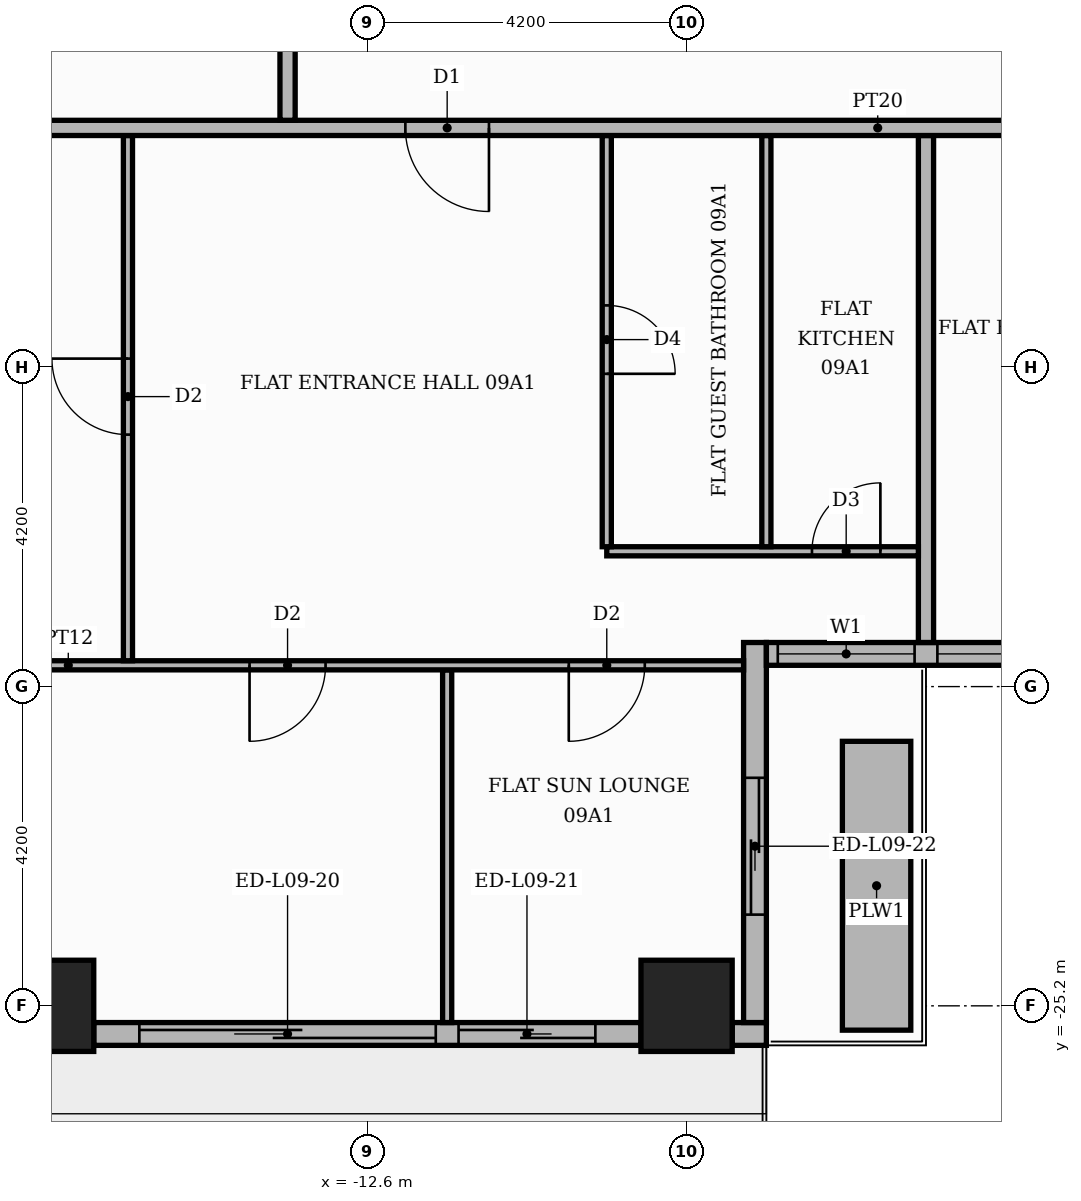
"""IFC4 building model, lengths in metres.
Left out: names, types, materials, properties, quantities, classifications, styles, units other than length and angle.
Written with IfcOpenShell. Run it as: python <this file> out.ifc"""

import sys

from ifc_helpers import new_model, si_unit, direction, frame, frame_2d, origin, origin_2d, place, context, subcontext, project, spatial, rectangle, extrude, element, fill, save


model = new_model("IFC4")
c1 = context("Model", 3, precision=1e-05, world=origin(), true_north=direction((0.0, 1.0)))
c2 = subcontext(c1, "Body", "Model", "MODEL_VIEW")
j1 = project(units=[si_unit("LENGTHUNIT", "METRE"), si_unit("PLANEANGLEUNIT", "RADIAN")], contexts=[c1])
p1 = place(None, origin())
s1 = spatial("IfcSite", under=j1, at=p1, CompositionType="ELEMENT")
p2 = place(p1, origin())
s2 = spatial("IfcBuilding", under=s1, at=p2, CompositionType="ELEMENT")
p3 = place(p2, frame((0.0, 0.0, 42.6)))
s3 = spatial("IfcBuildingStorey", under=s2, at=p3, CompositionType="ELEMENT", Elevation=42.6)
for number, where, z_axis, x_axis in (
    (1, (-8.4, -25.2, 0.0), (0.0, 0.0, 1.0), (1.0, 0.0, 0.0)),
    (2, (-16.8, -25.2, 0.0), (0.0, 0.0, 1.0), (1.0, 0.0, 0.0)),
):
    element("IfcColumn", number, at=place(p3, frame(where, z_axis=z_axis, x_axis=x_axis)), inside=s3, PredefinedType="COLUMN", context=c2, shape_type="SweptSolid", body=[
        extrude(rectangle(XDim=1.2, YDim=1.2, at=origin_2d()), origin(), (0.0, 0.0, 1.0), 3.9),
    ])
p4 = place(p3, frame((-16.2, -25.57, 0.0), z_axis=(0.0, 0.0, 1.0), x_axis=(1.0, 0.0, 0.0)))
e3 = element("IfcWall", 3, at=p4, inside=s3, PredefinedType="STANDARD", context=c2, shape_type="SweptSolid", body=[
    extrude(rectangle(XDim=7.2, YDim=0.3, at=frame_2d((3.6, 0.0))), origin(), (0.0, 0.0, 1.0), 3.48),
])
p5 = place(p4, frame((0.6, 0.0, 0.0)))
e4 = element("IfcOpeningElement", 4, at=p5, cuts=e3, PredefinedType="OPENING", context=c2, shape_type="SweptSolid", body=[
    extrude(rectangle(XDim=3.9, YDim=2.4, at=frame_2d((1.95, 1.2))), frame((0.0, 0.16, 0.0), z_axis=(0.0, -1.0, 0.0), x_axis=(1.0, 0.0, 0.0)), (0.0, 0.0, 1.0), 0.32),
])
p6 = place(p4, frame((4.8, 0.0, 0.0)))
e5 = element("IfcOpeningElement", 5, at=p6, cuts=e3, PredefinedType="OPENING", context=c2, shape_type="SweptSolid", body=[
    extrude(rectangle(XDim=1.8, YDim=2.4, at=frame_2d((0.9, 1.2))), frame((0.0, 0.16, 0.0), z_axis=(0.0, -1.0, 0.0), x_axis=(1.0, 0.0, 0.0)), (0.0, 0.0, 1.0), 0.32),
])
p7 = place(p3, frame((-7.8, -25.57, 0.0), z_axis=(0.0, 0.0, 1.0), x_axis=(1.0, 0.0, 0.0)))
e6 = element("IfcWall", 6, at=p7, inside=s3, PredefinedType="STANDARD", context=c2, shape_type="SweptSolid", body=[
    extrude(rectangle(XDim=0.45, YDim=0.3, at=frame_2d((0.225, 0.0))), origin(), (0.0, 0.0, 1.0), 3.48),
])
p8 = place(p3, frame((-7.5, -25.42, 0.0), z_axis=(0.0, 0.0, 1.0), x_axis=(0.0, 1.0, 0.0)))
e7 = element("IfcWall", 7, at=p8, inside=s3, PredefinedType="STANDARD", context=c2, shape_type="SweptSolid", body=[
    extrude(rectangle(XDim=5.0, YDim=0.3, at=frame_2d((2.5, 0.0))), origin(), (0.0, 0.0, 1.0), 3.48),
])
p9 = place(p8, frame((1.42, 0.0, 0.0)))
e8 = element("IfcOpeningElement", 8, at=p9, cuts=e7, PredefinedType="OPENING", context=c2, shape_type="SweptSolid", body=[
    extrude(rectangle(XDim=1.8, YDim=2.4, at=frame_2d((0.9, 1.2))), frame((0.0, 0.16, 0.0), z_axis=(0.0, -1.0, 0.0), x_axis=(1.0, 0.0, 0.0)), (0.0, 0.0, 1.0), 0.32),
])
p10 = place(p3, frame((-7.35, -20.57, 0.0), z_axis=(0.0, 0.0, 1.0), x_axis=(1.0, 0.0, 0.0)))
e9 = element("IfcWall", 9, at=p10, inside=s3, PredefinedType="STANDARD", context=c2, shape_type="SweptSolid", body=[
    extrude(rectangle(XDim=15.0, YDim=0.3, at=frame_2d((7.5, 0.0))), origin(), (0.0, 0.0, 1.0), 3.48),
])
p11 = place(p10, frame((0.15, 0.0, 0.9)))
e10 = element("IfcOpeningElement", 10, at=p11, cuts=e9, PredefinedType="OPENING", context=c2, shape_type="SweptSolid", body=[
    extrude(rectangle(XDim=1.8, YDim=2.1, at=frame_2d((0.9, 1.05))), frame((0.0, 0.16, 0.0), z_axis=(0.0, -1.0, 0.0), x_axis=(1.0, 0.0, 0.0)), (0.0, 0.0, 1.0), 0.32),
])
p12 = place(p10, frame((2.25, 0.0, 0.9)))
e11 = element("IfcOpeningElement", 11, at=p12, cuts=e9, PredefinedType="OPENING", context=c2, shape_type="SweptSolid", body=[
    extrude(rectangle(XDim=6.0, YDim=2.1, at=frame_2d((3.0, 1.05))), frame((0.0, 0.16, 0.0), z_axis=(0.0, -1.0, 0.0), x_axis=(1.0, 0.0, 0.0)), (0.0, 0.0, 1.0), 0.32),
])
p13 = place(p10, frame((8.55, 0.0, 0.9)))
e12 = element("IfcOpeningElement", 12, at=p13, cuts=e9, PredefinedType="OPENING", context=c2, shape_type="SweptSolid", body=[
    extrude(rectangle(XDim=6.0, YDim=2.1, at=frame_2d((3.0, 1.05))), frame((0.0, 0.16, 0.0), z_axis=(0.0, -1.0, 0.0), x_axis=(1.0, 0.0, 0.0)), (0.0, 0.0, 1.0), 0.32),
])
p14 = place(p3, frame((-5.9, -25.52, 0.0), z_axis=(0.0, 0.0, 1.0), x_axis=(0.0, 1.0, 0.0)))
e13 = element("IfcWall", 13, at=p14, inside=s3, PredefinedType="MOVABLE", context=c2, shape_type="SweptSolid", body=[
    extrude(rectangle(XDim=3.8, YDim=0.9, at=frame_2d((1.9, 0.0))), origin(), (0.0, 0.0, 1.0), 0.6),
])
p15 = place(p3, frame((-11.55, -25.42, 0.0), z_axis=(0.0, 0.0, 1.0), x_axis=(0.0, 1.0, 0.0)))
e14 = element("IfcWall", 14, at=p15, inside=s3, PredefinedType="PARTITIONING", context=c2, shape_type="SweptSolid", body=[
    extrude(rectangle(XDim=4.64, YDim=0.12, at=frame_2d((2.32, 0.0))), origin(), (0.0, 0.0, 1.0), 3.48),
])
p16 = place(p3, frame((-25.42, -20.72, 0.0), z_axis=(0.0, 0.0, 1.0), x_axis=(1.0, 0.0, 0.0)))
e15 = element("IfcWall", 15, at=p16, inside=s3, PredefinedType="PARTITIONING", context=c2, shape_type="SweptSolid", body=[
    extrude(rectangle(XDim=17.77, YDim=0.12, at=frame_2d((8.885, 0.0))), origin(), (0.0, 0.0, 1.0), 3.48),
])
p17 = place(p16, frame((11.27, 0.0, 0.0)))
e16 = element("IfcOpeningElement", 16, at=p17, cuts=e15, PredefinedType="OPENING", context=c2, shape_type="SweptSolid", body=[
    extrude(rectangle(XDim=1.0, YDim=2.1, at=frame_2d((0.5, 1.05))), frame((0.0, 0.07, 0.0), z_axis=(0.0, -1.0, 0.0), x_axis=(1.0, 0.0, 0.0)), (0.0, 0.0, 1.0), 0.14),
])
p18 = place(p16, frame((15.47, 0.0, 0.0)))
e17 = element("IfcOpeningElement", 17, at=p18, cuts=e15, PredefinedType="OPENING", context=c2, shape_type="SweptSolid", body=[
    extrude(rectangle(XDim=1.0, YDim=2.1, at=frame_2d((0.5, 1.05))), frame((0.0, 0.07, 0.0), z_axis=(0.0, -1.0, 0.0), x_axis=(1.0, 0.0, 0.0)), (0.0, 0.0, 1.0), 0.14),
])
p19 = place(p3, frame((-5.25, -20.42, 0.0), z_axis=(0.0, 0.0, 1.0), x_axis=(0.0, 1.0, 0.0)))
e18 = element("IfcWall", 18, at=p19, inside=s3, PredefinedType="PARTITIONING", context=c2, shape_type="SweptSolid", body=[
    extrude(rectangle(XDim=6.67, YDim=0.2, at=frame_2d((3.335, 0.0))), origin(), (0.0, 0.0, 1.0), 3.48),
])
p20 = place(p3, frame((-15.75, -20.66, 0.0), z_axis=(0.0, 0.0, 1.0), x_axis=(0.0, 1.0, 0.0)))
e19 = element("IfcWall", 19, at=p20, inside=s3, PredefinedType="PARTITIONING", context=c2, shape_type="SweptSolid", body=[
    extrude(rectangle(XDim=6.91, YDim=0.12, at=frame_2d((3.455, 0.0))), origin(), (0.0, 0.0, 1.0), 3.48),
])
p21 = place(p20, frame((2.975, 0.0, 0.0)))
e20 = element("IfcOpeningElement", 20, at=p21, cuts=e19, PredefinedType="OPENING", context=c2, shape_type="SweptSolid", body=[
    extrude(rectangle(XDim=1.0, YDim=2.1, at=frame_2d((0.5, 1.05))), frame((0.0, 0.07, 0.0), z_axis=(0.0, -1.0, 0.0), x_axis=(1.0, 0.0, 0.0)), (0.0, 0.0, 1.0), 0.14),
])
p22 = place(p3, frame((-9.45, -19.22, 0.0), z_axis=(0.0, 0.0, 1.0), x_axis=(1.0, 0.0, 0.0)))
e21 = element("IfcWall", 21, at=p22, inside=s3, PredefinedType="PARTITIONING", context=c2, shape_type="SweptSolid", body=[
    extrude(rectangle(XDim=4.1, YDim=0.12, at=frame_2d((2.05, 0.0))), origin(), (0.0, 0.0, 1.0), 3.48),
])
p23 = place(p22, frame((2.7, 0.0, 0.0)))
e22 = element("IfcOpeningElement", 22, at=p23, cuts=e21, PredefinedType="OPENING", context=c2, shape_type="SweptSolid", body=[
    extrude(rectangle(XDim=0.9, YDim=2.1, at=frame_2d((0.45, 1.05))), frame((0.0, 0.07, 0.0), z_axis=(0.0, -1.0, 0.0), x_axis=(1.0, 0.0, 0.0)), (0.0, 0.0, 1.0), 0.14),
])
p24 = place(p3, frame((-9.45, -19.16, 0.0), z_axis=(0.0, 0.0, 1.0), x_axis=(0.0, 1.0, 0.0)))
e23 = element("IfcWall", 23, at=p24, inside=s3, PredefinedType="PARTITIONING", context=c2, shape_type="SweptSolid", body=[
    extrude(rectangle(XDim=5.41, YDim=0.12, at=frame_2d((2.705, 0.0))), origin(), (0.0, 0.0, 1.0), 3.48),
])
p25 = place(p24, frame((2.275, 0.0, 0.0)))
e24 = element("IfcOpeningElement", 24, at=p25, cuts=e23, PredefinedType="OPENING", context=c2, shape_type="SweptSolid", body=[
    extrude(rectangle(XDim=0.9, YDim=2.1, at=frame_2d((0.45, 1.05))), frame((0.0, 0.07, 0.0), z_axis=(0.0, -1.0, 0.0), x_axis=(1.0, 0.0, 0.0)), (0.0, 0.0, 1.0), 0.14),
])
p26 = place(p3, frame((-7.35, -19.16, 0.0), z_axis=(0.0, 0.0, 1.0), x_axis=(0.0, 1.0, 0.0)))
e25 = element("IfcWall", 25, at=p26, inside=s3, PredefinedType="PARTITIONING", context=c2, shape_type="SweptSolid", body=[
    extrude(rectangle(XDim=5.41, YDim=0.12, at=frame_2d((2.705, 0.0))), origin(), (0.0, 0.0, 1.0), 3.48),
])
p27 = place(p3, frame((-25.42, -13.65, 0.0), z_axis=(0.0, 0.0, 1.0), x_axis=(1.0, 0.0, 0.0)))
e26 = element("IfcWall", 26, at=p27, inside=s3, PredefinedType="PARTITIONING", context=c2, shape_type="SweptSolid", body=[
    extrude(rectangle(XDim=39.07, YDim=0.2, at=frame_2d((19.535, 0.0))), origin(), (0.0, 0.0, 1.0), 3.48),
])
p28 = place(p27, frame((13.32, 0.0, 0.0)))
e27 = element("IfcOpeningElement", 27, at=p28, cuts=e26, PredefinedType="OPENING", context=c2, shape_type="SweptSolid", body=[
    extrude(rectangle(XDim=1.1, YDim=2.4, at=frame_2d((0.55, 1.2))), frame((0.0, 0.11, 0.0), z_axis=(0.0, -1.0, 0.0), x_axis=(1.0, 0.0, 0.0)), (0.0, 0.0, 1.0), 0.22),
])
p29 = place(p27, frame((21.72, 0.0, 0.0)))
e28 = element("IfcOpeningElement", 28, at=p29, cuts=e26, PredefinedType="OPENING", context=c2, shape_type="SweptSolid", body=[
    extrude(rectangle(XDim=1.1, YDim=2.4, at=frame_2d((0.55, 1.2))), frame((0.0, 0.11, 0.0), z_axis=(0.0, -1.0, 0.0), x_axis=(1.0, 0.0, 0.0)), (0.0, 0.0, 1.0), 0.22),
])
p30 = place(p3, frame((-13.65, -13.55, 0.0), z_axis=(0.0, 0.0, 1.0), x_axis=(0.0, 1.0, 0.0)))
e29 = element("IfcWall", 29, at=p30, inside=s3, PredefinedType="PARTITIONING", context=c2, shape_type="SweptSolid", body=[
    extrude(rectangle(XDim=27.1, YDim=0.2, at=frame_2d((13.55, 0.0))), origin(), (0.0, 0.0, 1.0), 3.48),
])
p31 = place(p30, frame((24.55, 0.0, 0.0)))
e30 = element("IfcOpeningElement", 30, at=p31, cuts=e29, PredefinedType="OPENING", context=c2, shape_type="SweptSolid", body=[
    extrude(rectangle(XDim=1.1, YDim=2.4, at=frame_2d((0.55, 1.2))), frame((0.0, 0.11, 0.0), z_axis=(0.0, -1.0, 0.0), x_axis=(1.0, 0.0, 0.0)), (0.0, 0.0, 1.0), 0.22),
])
p32 = place(p5, origin())
e31 = element("IfcDoor", 31, at=p32, inside=s3, OperationType="SLIDING_TO_LEFT", PredefinedType="DOOR", context=c2, shape_type="SweptSolid", body=[
    extrude(rectangle(XDim=3.9, YDim=2.4, at=frame_2d((1.95, 1.2))), frame((0.0, 0.025, 0.0), z_axis=(0.0, -1.0, 0.0), x_axis=(1.0, 0.0, 0.0)), (0.0, 0.0, 1.0), 0.05),
])
fill(e4, e31)
p33 = place(p6, origin())
e32 = element("IfcDoor", 32, at=p33, inside=s3, OperationType="SLIDING_TO_RIGHT", PredefinedType="DOOR", context=c2, shape_type="SweptSolid", body=[
    extrude(rectangle(XDim=1.8, YDim=2.4, at=frame_2d((0.9, 1.2))), frame((0.0, 0.025, 0.0), z_axis=(0.0, -1.0, 0.0), x_axis=(1.0, 0.0, 0.0)), (0.0, 0.0, 1.0), 0.05),
])
fill(e5, e32)
p34 = place(p9, origin())
e33 = element("IfcDoor", 33, at=p34, inside=s3, OperationType="SLIDING_TO_LEFT", PredefinedType="DOOR", context=c2, shape_type="SweptSolid", body=[
    extrude(rectangle(XDim=1.8, YDim=2.4, at=frame_2d((0.9, 1.2))), frame((0.0, 0.025, 0.0), z_axis=(0.0, -1.0, 0.0), x_axis=(1.0, 0.0, 0.0)), (0.0, 0.0, 1.0), 0.05),
])
fill(e8, e33)
p35 = place(p11, origin())
e34 = element("IfcWindow", 34, at=p35, inside=s3, PartitioningType="SINGLE_PANEL", PredefinedType="WINDOW", context=c2, shape_type="SweptSolid", body=[
    extrude(rectangle(XDim=1.8, YDim=2.1, at=frame_2d((0.9, 1.05))), frame((0.0, 0.03, 0.0), z_axis=(0.0, -1.0, 0.0), x_axis=(1.0, 0.0, 0.0)), (0.0, 0.0, 1.0), 0.06),
])
fill(e10, e34)
p36 = place(p12, origin())
e35 = element("IfcWindow", 35, at=p36, inside=s3, PartitioningType="SINGLE_PANEL", PredefinedType="WINDOW", context=c2, shape_type="SweptSolid", body=[
    extrude(rectangle(XDim=6.0, YDim=2.1, at=frame_2d((3.0, 1.05))), frame((0.0, 0.03, 0.0), z_axis=(0.0, -1.0, 0.0), x_axis=(1.0, 0.0, 0.0)), (0.0, 0.0, 1.0), 0.06),
])
fill(e11, e35)
p37 = place(p28, frame((1.1, 0.0, 0.0), z_axis=(0.0, 0.0, 1.0), x_axis=(-1.0, 0.0, 0.0)))
e36 = element("IfcDoor", 36, at=p37, inside=s3, OperationType="SINGLE_SWING_RIGHT", PredefinedType="DOOR", context=c2, shape_type="SweptSolid", body=[
    extrude(rectangle(XDim=1.1, YDim=2.4, at=frame_2d((0.55, 1.2))), frame((0.0, 0.025, 0.0), z_axis=(0.0, -1.0, 0.0), x_axis=(1.0, 0.0, 0.0)), (0.0, 0.0, 1.0), 0.05),
])
fill(e27, e36)
p38 = place(p21, origin())
e37 = element("IfcDoor", 37, at=p38, inside=s3, OperationType="SINGLE_SWING_RIGHT", PredefinedType="DOOR", context=c2, shape_type="SweptSolid", body=[
    extrude(rectangle(XDim=1.0, YDim=2.1, at=frame_2d((0.5, 1.05))), frame((0.0, 0.025, 0.0), z_axis=(0.0, -1.0, 0.0), x_axis=(1.0, 0.0, 0.0)), (0.0, 0.0, 1.0), 0.05),
])
fill(e20, e37)
p39 = place(p25, frame((0.9, 0.0, 0.0), z_axis=(0.0, 0.0, 1.0), x_axis=(-1.0, 0.0, 0.0)))
e38 = element("IfcDoor", 38, at=p39, inside=s3, OperationType="SINGLE_SWING_LEFT", PredefinedType="DOOR", context=c2, shape_type="SweptSolid", body=[
    extrude(rectangle(XDim=0.9, YDim=2.1, at=frame_2d((0.45, 1.05))), frame((0.0, 0.025, 0.0), z_axis=(0.0, -1.0, 0.0), x_axis=(1.0, 0.0, 0.0)), (0.0, 0.0, 1.0), 0.05),
])
fill(e24, e38)
p40 = place(p23, origin())
e39 = element("IfcDoor", 39, at=p40, inside=s3, OperationType="SINGLE_SWING_RIGHT", PredefinedType="DOOR", context=c2, shape_type="SweptSolid", body=[
    extrude(rectangle(XDim=0.9, YDim=2.1, at=frame_2d((0.45, 1.05))), frame((0.0, 0.025, 0.0), z_axis=(0.0, -1.0, 0.0), x_axis=(1.0, 0.0, 0.0)), (0.0, 0.0, 1.0), 0.05),
])
fill(e22, e39)
p41 = place(p17, frame((1.0, 0.0, 0.0), z_axis=(0.0, 0.0, 1.0), x_axis=(-1.0, 0.0, 0.0)))
e40 = element("IfcDoor", 40, at=p41, inside=s3, OperationType="SINGLE_SWING_LEFT", PredefinedType="DOOR", context=c2, shape_type="SweptSolid", body=[
    extrude(rectangle(XDim=1.0, YDim=2.1, at=frame_2d((0.5, 1.05))), frame((0.0, 0.025, 0.0), z_axis=(0.0, -1.0, 0.0), x_axis=(1.0, 0.0, 0.0)), (0.0, 0.0, 1.0), 0.05),
])
fill(e16, e40)
p42 = place(p18, frame((1.0, 0.0, 0.0), z_axis=(0.0, 0.0, 1.0), x_axis=(-1.0, 0.0, 0.0)))
e41 = element("IfcDoor", 41, at=p42, inside=s3, OperationType="SINGLE_SWING_LEFT", PredefinedType="DOOR", context=c2, shape_type="SweptSolid", body=[
    extrude(rectangle(XDim=1.0, YDim=2.1, at=frame_2d((0.5, 1.05))), frame((0.0, 0.025, 0.0), z_axis=(0.0, -1.0, 0.0), x_axis=(1.0, 0.0, 0.0)), (0.0, 0.0, 1.0), 0.05),
])
fill(e17, e41)
save(model, sys.argv[1])
